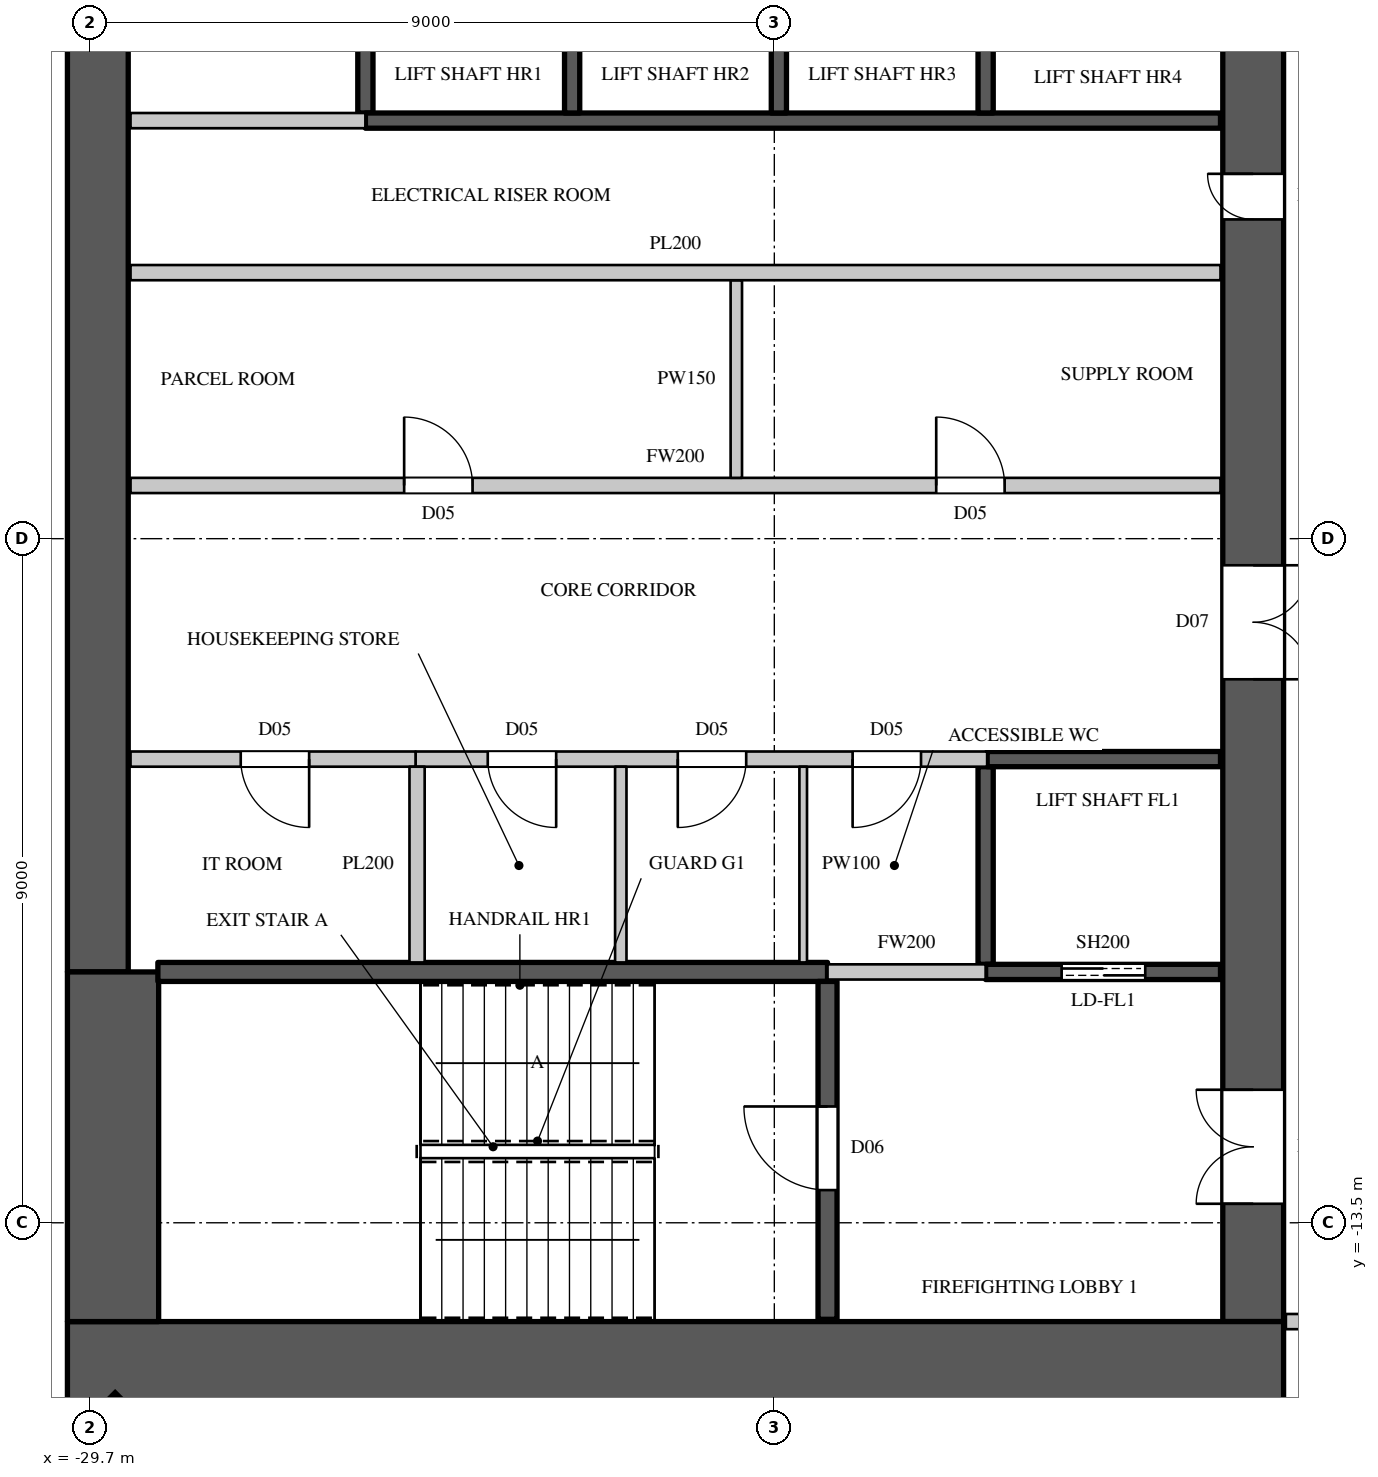
"""IFC4 building model, lengths in metres.
Left out: names, types, materials, properties, quantities, classifications, styles, units other than length and angle.
Written with IfcOpenShell. Run it as: python <this file> out.ifc"""

import sys

from ifc_helpers import new_model, si_unit, direction, frame, frame_2d, origin, origin_2d, place, context, subcontext, project, spatial, rectangle, extrude, element, fill, save


model = new_model("IFC4")
c1 = context("Model", 3, precision=1e-05, world=origin(), true_north=direction((0.0, 1.0)))
c2 = subcontext(c1, "Body", "Model", "MODEL_VIEW")
j1 = project(units=[si_unit("LENGTHUNIT", "METRE"), si_unit("PLANEANGLEUNIT", "RADIAN")], contexts=[c1])
p1 = place(None, origin())
s1 = spatial("IfcSite", under=j1, at=p1, CompositionType="ELEMENT")
p2 = place(p1, origin())
s2 = spatial("IfcBuilding", under=s1, at=p2, CompositionType="ELEMENT")
p3 = place(p2, frame((0.0, 0.0, 209.7)))
s3 = spatial("IfcBuildingStorey", under=s2, at=p3, CompositionType="ELEMENT", Elevation=209.7)
p4 = place(p3, frame((-29.443, -16.443, 0.0), z_axis=(0.0, 0.0, 1.0), x_axis=(0.707106781187, -0.707106781187, 0.0)))
e1 = element("IfcColumn", 1, at=p4, inside=s3, PredefinedType="COLUMN", context=c2, shape_type="SweptSolid", body=[
    extrude(rectangle(XDim=0.9, YDim=1.1, at=origin_2d()), origin(), (0.0, 0.0, 1.0), 4.1),
])
p5 = place(p3, frame((-30.0, -15.4, 0.0), z_axis=(0.0, 0.0, 1.0), x_axis=(1.0, 0.0, 0.0)))
e2 = element("IfcWall", 2, at=p5, inside=s3, PredefinedType="SHEAR", context=c2, shape_type="SweptSolid", body=[
    extrude(rectangle(XDim=16.0, YDim=1.2, at=frame_2d((8.0, 0.0))), origin(), (0.0, 0.0, 1.0), 4.1),
])
p6 = place(p3, frame((-14.4, -14.8, 0.0), z_axis=(0.0, 0.0, 1.0), x_axis=(0.0, 1.0, 0.0)))
e3 = element("IfcWall", 3, at=p6, inside=s3, PredefinedType="SHEAR", context=c2, shape_type="SweptSolid", body=[
    extrude(rectangle(XDim=29.6, YDim=0.8, at=frame_2d((14.8, 0.0))), origin(), (0.0, 0.0, 1.0), 4.1),
])
p7 = place(p6, frame((1.55, 0.0, 0.0)))
e4 = element("IfcOpeningElement", 4, at=p7, cuts=e3, PredefinedType="OPENING", context=c2, shape_type="SweptSolid", body=[
    extrude(rectangle(XDim=1.5, YDim=2.4, at=frame_2d((0.75, 1.2))), frame((0.0, 0.41, 0.0), z_axis=(0.0, -1.0, 0.0), x_axis=(1.0, 0.0, 0.0)), (0.0, 0.0, 1.0), 0.82),
])
p8 = place(p6, frame((26.55, 0.0, 0.0)))
e5 = element("IfcOpeningElement", 5, at=p8, cuts=e3, PredefinedType="OPENING", context=c2, shape_type="SweptSolid", body=[
    extrude(rectangle(XDim=1.5, YDim=2.4, at=frame_2d((0.75, 1.2))), frame((0.0, 0.41, 0.0), z_axis=(0.0, -1.0, 0.0), x_axis=(1.0, 0.0, 0.0)), (0.0, 0.0, 1.0), 0.82),
])
p9 = place(p6, frame((8.45, 0.0, 0.0)))
e6 = element("IfcOpeningElement", 6, at=p9, cuts=e3, PredefinedType="OPENING", context=c2, shape_type="SweptSolid", body=[
    extrude(rectangle(XDim=1.5, YDim=2.4, at=frame_2d((0.75, 1.2))), frame((0.0, 0.41, 0.0), z_axis=(0.0, -1.0, 0.0), x_axis=(1.0, 0.0, 0.0)), (0.0, 0.0, 1.0), 0.82),
])
p10 = place(p6, frame((19.65, 0.0, 0.0)))
e7 = element("IfcOpeningElement", 7, at=p10, cuts=e3, PredefinedType="OPENING", context=c2, shape_type="SweptSolid", body=[
    extrude(rectangle(XDim=1.5, YDim=2.4, at=frame_2d((0.75, 1.2))), frame((0.0, 0.41, 0.0), z_axis=(0.0, -1.0, 0.0), x_axis=(1.0, 0.0, 0.0)), (0.0, 0.0, 1.0), 0.82),
])
p11 = place(p6, frame((14.5, 0.0, 0.0)))
e8 = element("IfcOpeningElement", 8, at=p11, cuts=e3, PredefinedType="OPENING", context=c2, shape_type="SweptSolid", body=[
    extrude(rectangle(XDim=0.6, YDim=2.0, at=frame_2d((0.3, 1.0))), frame((0.0, 0.41, 0.0), z_axis=(0.0, -1.0, 0.0), x_axis=(1.0, 0.0, 0.0)), (0.0, 0.0, 1.0), 0.82),
])
p12 = place(p3, frame((-29.6, -10.2, 0.0), z_axis=(0.0, 0.0, 1.0), x_axis=(0.0, 1.0, 0.0)))
e9 = element("IfcWall", 9, at=p12, inside=s3, PredefinedType="SHEAR", context=c2, shape_type="SweptSolid", body=[
    extrude(rectangle(XDim=20.4, YDim=0.8, at=frame_2d((10.2, 0.0))), origin(), (0.0, 0.0, 1.0), 4.1),
])
p13 = place(p3, frame((-29.4, -14.8, 0.0), z_axis=(0.0, 0.0, 1.0), x_axis=(0.0, 1.0, 0.0)))
e10 = element("IfcWall", 10, at=p13, inside=s3, PredefinedType="SHEAR", context=c2, shape_type="SweptSolid", body=[
    extrude(rectangle(XDim=4.6, YDim=1.2, at=frame_2d((2.3, 0.0))), origin(), (0.0, 0.0, 1.0), 4.1),
])
p14 = place(p3, frame((-29.17, -3.8, 0.0), z_axis=(0.0, 0.0, 1.0), x_axis=(1.0, 0.0, 0.0)))
e11 = element("IfcWall", 11, at=p14, inside=s3, PredefinedType="PARTITIONING", context=c2, shape_type="SweptSolid", body=[
    extrude(rectangle(XDim=14.34, YDim=0.2, at=frame_2d((7.17, 0.0))), origin(), (0.0, 0.0, 1.0), 3.8),
])
p15 = place(p14, frame((3.6, 0.0, 0.0)))
e12 = element("IfcOpeningElement", 12, at=p15, cuts=e11, PredefinedType="OPENING", context=c2, shape_type="SweptSolid", body=[
    extrude(rectangle(XDim=0.9, YDim=2.2, at=frame_2d((0.45, 1.1))), frame((0.0, 0.11, 0.0), z_axis=(0.0, -1.0, 0.0), x_axis=(1.0, 0.0, 0.0)), (0.0, 0.0, 1.0), 0.22),
])
p16 = place(p14, frame((10.6, 0.0, 0.0)))
e13 = element("IfcOpeningElement", 13, at=p16, cuts=e11, PredefinedType="OPENING", context=c2, shape_type="SweptSolid", body=[
    extrude(rectangle(XDim=0.9, YDim=2.2, at=frame_2d((0.45, 1.1))), frame((0.0, 0.11, 0.0), z_axis=(0.0, -1.0, 0.0), x_axis=(1.0, 0.0, 0.0)), (0.0, 0.0, 1.0), 0.22),
])
p17 = place(p3, frame((-25.42, -7.4, 0.0), z_axis=(0.0, 0.0, 1.0), x_axis=(1.0, 0.0, 0.0)))
e14 = element("IfcWall", 14, at=p17, inside=s3, PredefinedType="PARTITIONING", context=c2, shape_type="SweptSolid", body=[
    extrude(rectangle(XDim=7.52, YDim=0.2, at=frame_2d((3.76, 0.0))), origin(), (0.0, 0.0, 1.0), 3.8),
])
p18 = place(p17, frame((0.95, 0.0, 0.0)))
e15 = element("IfcOpeningElement", 15, at=p18, cuts=e14, PredefinedType="OPENING", context=c2, shape_type="SweptSolid", body=[
    extrude(rectangle(XDim=0.9, YDim=2.2, at=frame_2d((0.45, 1.1))), frame((0.0, 0.11, 0.0), z_axis=(0.0, -1.0, 0.0), x_axis=(1.0, 0.0, 0.0)), (0.0, 0.0, 1.0), 0.22),
])
p19 = place(p17, frame((3.45, 0.0, 0.0)))
e16 = element("IfcOpeningElement", 16, at=p19, cuts=e14, PredefinedType="OPENING", context=c2, shape_type="SweptSolid", body=[
    extrude(rectangle(XDim=0.9, YDim=2.2, at=frame_2d((0.45, 1.1))), frame((0.0, 0.11, 0.0), z_axis=(0.0, -1.0, 0.0), x_axis=(1.0, 0.0, 0.0)), (0.0, 0.0, 1.0), 0.22),
])
p20 = place(p17, frame((5.75, 0.0, 0.0)))
e17 = element("IfcOpeningElement", 17, at=p20, cuts=e14, PredefinedType="OPENING", context=c2, shape_type="SweptSolid", body=[
    extrude(rectangle(XDim=0.9, YDim=2.2, at=frame_2d((0.45, 1.1))), frame((0.0, 0.11, 0.0), z_axis=(0.0, -1.0, 0.0), x_axis=(1.0, 0.0, 0.0)), (0.0, 0.0, 1.0), 0.22),
])
p21 = place(p3, frame((-20.0, -10.2, 0.0), z_axis=(0.0, 0.0, 1.0), x_axis=(1.0, 0.0, 0.0)))
e18 = element("IfcWall", 18, at=p21, inside=s3, PredefinedType="PARTITIONING", context=c2, shape_type="SweptSolid", body=[
    extrude(rectangle(XDim=2.08, YDim=0.2, at=frame_2d((1.04, 0.0))), origin(), (0.0, 0.0, 1.0), 3.8),
])
p22 = place(p3, frame((-13.97, -14.8, 0.0), z_axis=(0.0, 0.0, 1.0), x_axis=(1.0, 0.0, 0.0)))
e19 = element("IfcWall", 19, at=p22, inside=s3, PredefinedType="PARTITIONING", context=c2, shape_type="SweptSolid", body=[
    extrude(rectangle(XDim=2.87, YDim=0.2, at=frame_2d((1.435, 0.0))), origin(), (0.0, 0.0, 1.0), 3.8),
])
p23 = place(p3, frame((-22.72, -10.075, 0.0), z_axis=(0.0, 0.0, 1.0), x_axis=(0.0, 1.0, 0.0)))
e20 = element("IfcWall", 20, at=p23, inside=s3, PredefinedType="PARTITIONING", context=c2, shape_type="SweptSolid", body=[
    extrude(rectangle(XDim=2.575, YDim=0.15, at=frame_2d((1.288, 0.0))), origin(), (0.0, 0.0, 1.0), 3.8),
])
p24 = place(p3, frame((-21.2, -3.7, 0.0), z_axis=(0.0, 0.0, 1.0), x_axis=(0.0, 1.0, 0.0)))
e21 = element("IfcWall", 21, at=p24, inside=s3, PredefinedType="PARTITIONING", context=c2, shape_type="SweptSolid", body=[
    extrude(rectangle(XDim=2.6, YDim=0.15, at=frame_2d((1.3, 0.0))), origin(), (0.0, 0.0, 1.0), 3.8),
])
p25 = place(p3, frame((-29.17, -7.4, 0.0), z_axis=(0.0, 0.0, 1.0), x_axis=(1.0, 0.0, 0.0)))
e22 = element("IfcWall", 22, at=p25, inside=s3, PredefinedType="PARTITIONING", context=c2, shape_type="SweptSolid", body=[
    extrude(rectangle(XDim=3.75, YDim=0.2, at=frame_2d((1.875, 0.0))), origin(), (0.0, 0.0, 1.0), 3.8),
])
p26 = place(p25, frame((1.45, 0.0, 0.0)))
e23 = element("IfcOpeningElement", 23, at=p26, cuts=e22, PredefinedType="OPENING", context=c2, shape_type="SweptSolid", body=[
    extrude(rectangle(XDim=0.9, YDim=2.2, at=frame_2d((0.45, 1.1))), frame((0.0, 0.11, 0.0), z_axis=(0.0, -1.0, 0.0), x_axis=(1.0, 0.0, 0.0)), (0.0, 0.0, 1.0), 0.22),
])
p27 = place(p3, frame((-29.17, -1.0, 0.0), z_axis=(0.0, 0.0, 1.0), x_axis=(1.0, 0.0, 0.0)))
e24 = element("IfcWall", 24, at=p27, inside=s3, PredefinedType="PARTITIONING", context=c2, shape_type="SweptSolid", body=[
    extrude(rectangle(XDim=14.34, YDim=0.2, at=frame_2d((7.17, 0.0))), origin(), (0.0, 0.0, 1.0), 3.8),
])
p28 = place(p3, frame((-29.17, 1.0, 0.0), z_axis=(0.0, 0.0, 1.0), x_axis=(1.0, 0.0, 0.0)))
e25 = element("IfcWall", 25, at=p28, inside=s3, PredefinedType="PARTITIONING", context=c2, shape_type="SweptSolid", body=[
    extrude(rectangle(XDim=3.09, YDim=0.2, at=frame_2d((1.545, 0.0))), origin(), (0.0, 0.0, 1.0), 3.8),
])
p29 = place(p3, frame((-25.4, -10.075, 0.0), z_axis=(0.0, 0.0, 1.0), x_axis=(0.0, 1.0, 0.0)))
e26 = element("IfcWall", 26, at=p29, inside=s3, PredefinedType="PARTITIONING", context=c2, shape_type="SweptSolid", body=[
    extrude(rectangle(XDim=2.575, YDim=0.2, at=frame_2d((1.288, 0.0))), origin(), (0.0, 0.0, 1.0), 3.8),
])
p30 = place(p3, frame((-26.08, 1.1, 0.0), z_axis=(0.0, 0.0, 1.0), x_axis=(0.0, 1.0, 0.0)))
e27 = element("IfcWall", 27, at=p30, inside=s3, PredefinedType="SHEAR", context=c2, shape_type="SweptSolid", body=[
    extrude(rectangle(XDim=2.6, YDim=0.2, at=frame_2d((1.3, 0.0))), origin(), (0.0, 0.0, 1.0), 3.8),
])
p31 = place(p3, frame((-26.08, 1.0, 0.0), z_axis=(0.0, 0.0, 1.0), x_axis=(1.0, 0.0, 0.0)))
e28 = element("IfcWall", 28, at=p31, inside=s3, PredefinedType="SHEAR", context=c2, shape_type="SweptSolid", body=[
    extrude(rectangle(XDim=11.25, YDim=0.2, at=frame_2d((5.625, 0.0))), origin(), (0.0, 0.0, 1.0), 3.8),
])
for number, where, z_axis, x_axis in (
    (29, (-23.36, 1.1, 0.0), (0.0, 0.0, 1.0), (0.0, 1.0, 0.0)),
    (30, (-20.64, 1.1, 0.0), (0.0, 0.0, 1.0), (0.0, 1.0, 0.0)),
):
    element("IfcWall", number, at=place(p3, frame(where, z_axis=z_axis, x_axis=x_axis)), inside=s3, PredefinedType="SHEAR", context=c2, shape_type="SweptSolid", body=[
        extrude(rectangle(XDim=2.6, YDim=0.2, at=frame_2d((1.3, 0.0))), origin(), (0.0, 0.0, 1.0), 4.1),
    ])
p32 = place(p3, frame((-17.92, -10.1, 0.0), z_axis=(0.0, 0.0, 1.0), x_axis=(0.0, 1.0, 0.0)))
e31 = element("IfcWall", 31, at=p32, inside=s3, PredefinedType="SHEAR", context=c2, shape_type="SweptSolid", body=[
    extrude(rectangle(XDim=2.6, YDim=0.2, at=frame_2d((1.3, 0.0))), origin(), (0.0, 0.0, 1.0), 3.8),
])
p33 = place(p3, frame((-17.92, -10.2, 0.0), z_axis=(0.0, 0.0, 1.0), x_axis=(1.0, 0.0, 0.0)))
e32 = element("IfcWall", 32, at=p33, inside=s3, PredefinedType="SHEAR", context=c2, shape_type="SweptSolid", body=[
    extrude(rectangle(XDim=3.09, YDim=0.2, at=frame_2d((1.545, 0.0))), origin(), (0.0, 0.0, 1.0), 3.8),
])
p34 = place(p33, frame((1.0, 0.0, 0.0)))
e33 = element("IfcOpeningElement", 33, at=p34, cuts=e32, PredefinedType="OPENING", context=c2, shape_type="SweptSolid", body=[
    extrude(rectangle(XDim=1.1, YDim=2.2, at=frame_2d((0.55, 1.1))), frame((0.0, 0.11, 0.0), z_axis=(0.0, -1.0, 0.0), x_axis=(1.0, 0.0, 0.0)), (0.0, 0.0, 1.0), 0.22),
])
p35 = place(p3, frame((-17.9, -7.4, 0.0), z_axis=(0.0, 0.0, 1.0), x_axis=(1.0, 0.0, 0.0)))
e34 = element("IfcWall", 34, at=p35, inside=s3, PredefinedType="SHEAR", context=c2, shape_type="SweptSolid", body=[
    extrude(rectangle(XDim=3.07, YDim=0.2, at=frame_2d((1.535, 0.0))), origin(), (0.0, 0.0, 1.0), 3.8),
])
p36 = place(p3, frame((-17.92, 1.1, 0.0), z_axis=(0.0, 0.0, 1.0), x_axis=(0.0, 1.0, 0.0)))
e35 = element("IfcWall", 35, at=p36, inside=s3, PredefinedType="SHEAR", context=c2, shape_type="SweptSolid", body=[
    extrude(rectangle(XDim=2.6, YDim=0.2, at=frame_2d((1.3, 0.0))), origin(), (0.0, 0.0, 1.0), 4.1),
])
p37 = place(p3, frame((-28.81, -10.2, 0.0), z_axis=(0.0, 0.0, 1.0), x_axis=(1.0, 0.0, 0.0)))
e36 = element("IfcWall", 36, at=p37, inside=s3, PredefinedType="SHEAR", context=c2, shape_type="SweptSolid", body=[
    extrude(rectangle(XDim=8.81, YDim=0.25, at=frame_2d((4.405, 0.0))), origin(), (0.0, 0.0, 1.0), 3.8),
])
p38 = place(p3, frame((-20.0, -14.77, 0.0), z_axis=(0.0, 0.0, 1.0), x_axis=(0.0, 1.0, 0.0)))
e37 = element("IfcWall", 37, at=p38, inside=s3, PredefinedType="SHEAR", context=c2, shape_type="SweptSolid", body=[
    extrude(rectangle(XDim=4.445, YDim=0.25, at=frame_2d((2.223, 0.0))), origin(), (0.0, 0.0, 1.0), 3.8),
])
p39 = place(p38, frame((1.7, 0.0, 0.0)))
e38 = element("IfcOpeningElement", 38, at=p39, cuts=e37, PredefinedType="OPENING", context=c2, shape_type="SweptSolid", body=[
    extrude(rectangle(XDim=1.1, YDim=2.2, at=frame_2d((0.55, 1.1))), frame((0.0, 0.135, 0.0), z_axis=(0.0, -1.0, 0.0), x_axis=(1.0, 0.0, 0.0)), (0.0, 0.0, 1.0), 0.27),
])
p40 = place(p3, frame((-20.32, -10.075, 0.0), z_axis=(0.0, 0.0, 1.0), x_axis=(0.0, 1.0, 0.0)))
e39 = element("IfcWall", 39, at=p40, inside=s3, PredefinedType="PARTITIONING", context=c2, shape_type="SweptSolid", body=[
    extrude(rectangle(XDim=2.575, YDim=0.1, at=frame_2d((1.288, 0.0))), origin(), (0.0, 0.0, 1.0), 3.8),
])
p41 = place(p39, origin())
e40 = element("IfcDoor", 40, at=p41, inside=s3, OperationType="SINGLE_SWING_RIGHT", PredefinedType="DOOR", context=c2, shape_type="SweptSolid", body=[
    extrude(rectangle(XDim=1.1, YDim=2.2, at=frame_2d((0.55, 1.1))), frame((0.0, 0.025, 0.0), z_axis=(0.0, -1.0, 0.0), x_axis=(1.0, 0.0, 0.0)), (0.0, 0.0, 1.0), 0.05),
])
fill(e38, e40)
p42 = place(p26, origin())
e41 = element("IfcDoor", 41, at=p42, inside=s3, OperationType="SINGLE_SWING_LEFT", PredefinedType="DOOR", context=c2, shape_type="SweptSolid", body=[
    extrude(rectangle(XDim=0.9, YDim=2.2, at=frame_2d((0.45, 1.1))), frame((0.0, 0.025, 0.0), z_axis=(0.0, -1.0, 0.0), x_axis=(1.0, 0.0, 0.0)), (0.0, 0.0, 1.0), 0.05),
])
fill(e23, e41)
p43 = place(p18, origin())
e42 = element("IfcDoor", 42, at=p43, inside=s3, OperationType="SINGLE_SWING_LEFT", PredefinedType="DOOR", context=c2, shape_type="SweptSolid", body=[
    extrude(rectangle(XDim=0.9, YDim=2.2, at=frame_2d((0.45, 1.1))), frame((0.0, 0.025, 0.0), z_axis=(0.0, -1.0, 0.0), x_axis=(1.0, 0.0, 0.0)), (0.0, 0.0, 1.0), 0.05),
])
fill(e15, e42)
p44 = place(p19, origin())
e43 = element("IfcDoor", 43, at=p44, inside=s3, OperationType="SINGLE_SWING_RIGHT", PredefinedType="DOOR", context=c2, shape_type="SweptSolid", body=[
    extrude(rectangle(XDim=0.9, YDim=2.2, at=frame_2d((0.45, 1.1))), frame((0.0, 0.025, 0.0), z_axis=(0.0, -1.0, 0.0), x_axis=(1.0, 0.0, 0.0)), (0.0, 0.0, 1.0), 0.05),
])
fill(e16, e43)
p45 = place(p20, origin())
e44 = element("IfcDoor", 44, at=p45, inside=s3, OperationType="SINGLE_SWING_RIGHT", PredefinedType="DOOR", context=c2, shape_type="SweptSolid", body=[
    extrude(rectangle(XDim=0.9, YDim=2.2, at=frame_2d((0.45, 1.1))), frame((0.0, 0.025, 0.0), z_axis=(0.0, -1.0, 0.0), x_axis=(1.0, 0.0, 0.0)), (0.0, 0.0, 1.0), 0.05),
])
fill(e17, e44)
p46 = place(p15, origin())
e45 = element("IfcDoor", 45, at=p46, inside=s3, OperationType="SINGLE_SWING_LEFT", PredefinedType="DOOR", context=c2, shape_type="SweptSolid", body=[
    extrude(rectangle(XDim=0.9, YDim=2.2, at=frame_2d((0.45, 1.1))), frame((0.0, 0.025, 0.0), z_axis=(0.0, -1.0, 0.0), x_axis=(1.0, 0.0, 0.0)), (0.0, 0.0, 1.0), 0.05),
])
fill(e12, e45)
p47 = place(p16, origin())
e46 = element("IfcDoor", 46, at=p47, inside=s3, OperationType="SINGLE_SWING_LEFT", PredefinedType="DOOR", context=c2, shape_type="SweptSolid", body=[
    extrude(rectangle(XDim=0.9, YDim=2.2, at=frame_2d((0.45, 1.1))), frame((0.0, 0.025, 0.0), z_axis=(0.0, -1.0, 0.0), x_axis=(1.0, 0.0, 0.0)), (0.0, 0.0, 1.0), 0.05),
])
fill(e13, e46)
p48 = place(p34, origin())
e47 = element("IfcDoor", 47, at=p48, inside=s3, OperationType="DOUBLE_DOOR_SLIDING", PredefinedType="DOOR", context=c2, shape_type="SweptSolid", body=[
    extrude(rectangle(XDim=1.1, YDim=2.2, at=frame_2d((0.55, 1.1))), frame((0.0, 0.025, 0.0), z_axis=(0.0, -1.0, 0.0), x_axis=(1.0, 0.0, 0.0)), (0.0, 0.0, 1.0), 0.05),
])
fill(e33, e47)
p49 = place(p7, origin())
e48 = element("IfcDoor", 48, at=p49, inside=s3, OperationType="DOUBLE_DOOR_SINGLE_SWING", PredefinedType="DOOR", context=c2, shape_type="SweptSolid", body=[
    extrude(rectangle(XDim=1.5, YDim=2.4, at=frame_2d((0.75, 1.2))), frame((0.0, 0.395, 0.0), z_axis=(0.0, -1.0, 0.0), x_axis=(1.0, 0.0, 0.0)), (0.0, 0.0, 1.0), 0.05),
])
fill(e4, e48)
p50 = place(p9, origin())
e49 = element("IfcDoor", 49, at=p50, inside=s3, OperationType="DOUBLE_DOOR_SINGLE_SWING", PredefinedType="DOOR", context=c2, shape_type="SweptSolid", body=[
    extrude(rectangle(XDim=1.5, YDim=2.4, at=frame_2d((0.75, 1.2))), frame((0.0, -0.345, 0.0), z_axis=(0.0, -1.0, 0.0), x_axis=(1.0, 0.0, 0.0)), (0.0, 0.0, 1.0), 0.05),
])
fill(e6, e49)
p51 = place(p11, origin())
e50 = element("IfcDoor", 50, at=p51, inside=s3, OperationType="SINGLE_SWING_RIGHT", PredefinedType="DOOR", context=c2, shape_type="SweptSolid", body=[
    extrude(rectangle(XDim=0.6, YDim=2.0, at=frame_2d((0.3, 1.0))), frame((0.0, 0.395, 0.0), z_axis=(0.0, -1.0, 0.0), x_axis=(1.0, 0.0, 0.0)), (0.0, 0.0, 1.0), 0.05),
])
fill(e8, e50)
save(model, sys.argv[1])
